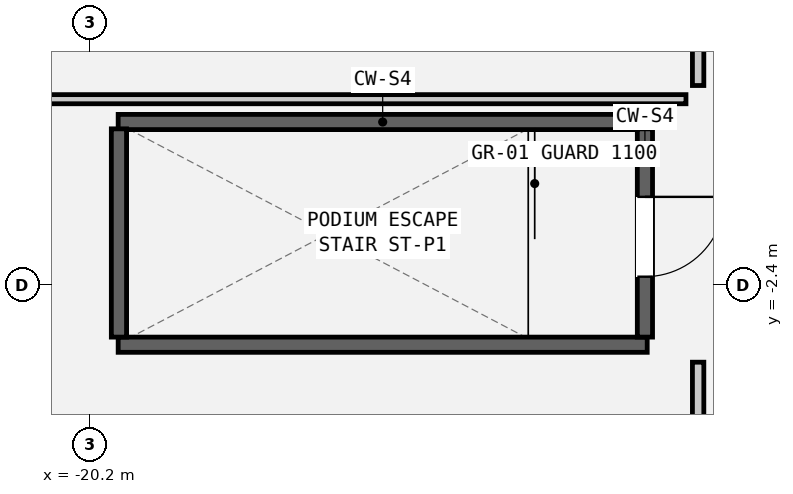
"""IFC4 building model, lengths in metres.
Left out: names, types, materials, properties, quantities, classifications, styles, units other than length and angle.
Written with IfcOpenShell. Run it as: python <this file> out.ifc"""

import sys

from ifc_helpers import new_model, si_unit, direction, frame, frame_2d, origin, place, context, subcontext, project, spatial, rectangle, extrude, element, fill, save


model = new_model("IFC4")
c1 = context("Model", 3, precision=1e-05, world=origin(), true_north=direction((0.0, 1.0)))
c2 = subcontext(c1, "Body", "Model", "MODEL_VIEW")
j1 = project(units=[si_unit("LENGTHUNIT", "METRE"), si_unit("PLANEANGLEUNIT", "RADIAN")], contexts=[c1])
p1 = place(None, origin())
s1 = spatial("IfcSite", under=j1, at=p1, CompositionType="ELEMENT")
p2 = place(p1, origin())
s2 = spatial("IfcBuilding", under=s1, at=p2, CompositionType="ELEMENT")
p3 = place(p2, frame((0.0, 0.0, 26.1)))
s3 = spatial("IfcBuildingStorey", under=s2, at=p3, CompositionType="ELEMENT", Elevation=26.1)
for number, where, z_axis, x_axis in (
    (1, (-19.83, -0.25, 0.0), (0.0, 0.0, 1.0), (1.0, 0.0, 0.0)),
    (2, (-19.83, -3.18, 0.0), (0.0, 0.0, 1.0), (1.0, 0.0, 0.0)),
):
    element("IfcWall", number, at=place(p3, frame(where, z_axis=z_axis, x_axis=x_axis)), inside=s3, PredefinedType="SHEAR", context=c2, shape_type="SweptSolid", body=[
        extrude(rectangle(XDim=6.96, YDim=0.2, at=frame_2d((3.48, 0.0))), origin(), (0.0, 0.0, 1.0), 2.83),
    ])
p4 = place(p3, frame((-12.9, -0.34, 0.0), z_axis=(0.0, 0.0, 1.0), x_axis=(0.0, -1.0, 0.0)))
e3 = element("IfcWall", 3, at=p4, inside=s3, PredefinedType="SHEAR", context=c2, shape_type="SweptSolid", body=[
    extrude(rectangle(XDim=2.74, YDim=0.2, at=frame_2d((1.37, 0.0))), origin(), (0.0, 0.0, 1.0), 2.83),
])
p5 = place(p4, frame((0.895, 0.0, 0.0)))
e4 = element("IfcOpeningElement", 4, at=p5, cuts=e3, PredefinedType="OPENING", context=c2, shape_type="SweptSolid", body=[
    extrude(rectangle(XDim=1.05, YDim=2.08, at=frame_2d((0.525, 1.04))), frame((0.0, 0.112, 0.0), z_axis=(0.0, -1.0, 0.0), x_axis=(1.0, 0.0, 0.0)), (0.0, 0.0, 1.0), 0.224),
])
p6 = place(p3, frame((-19.82, -3.08, 0.0), z_axis=(0.0, 0.0, 1.0), x_axis=(0.0, 1.0, 0.0)))
e5 = element("IfcWall", 5, at=p6, inside=s3, PredefinedType="SHEAR", context=c2, shape_type="SweptSolid", body=[
    extrude(rectangle(XDim=2.74, YDim=0.2, at=frame_2d((1.37, 0.0))), origin(), (0.0, 0.0, 1.0), 2.83),
])
p7 = place(p3, frame((-26.28, 0.05, 0.0), z_axis=(0.0, 0.0, 1.0), x_axis=(1.0, 0.0, 0.0)))
e6 = element("IfcWall", 6, at=p7, inside=s3, PredefinedType="PARTITIONING", context=c2, shape_type="SweptSolid", body=[
    extrude(rectangle(XDim=13.92, YDim=0.12, at=frame_2d((6.96, 0.0))), origin(), (0.0, 0.0, 1.0), 2.83),
])
p8 = place(p3, frame((-12.2, -11.42, 0.0), z_axis=(0.0, 0.0, 1.0), x_axis=(0.0, 1.0, 0.0)))
e7 = element("IfcWall", 7, at=p8, inside=s3, PredefinedType="PARTITIONING", context=c2, shape_type="SweptSolid", body=[
    extrude(rectangle(XDim=8.01, YDim=0.15, at=frame_2d((4.005, 0.0))), origin(), (0.0, 0.0, 1.0), 2.83),
])
p9 = place(p8, frame((3.53, 0.0, 0.0)))
e8 = element("IfcOpeningElement", 8, at=p9, cuts=e7, PredefinedType="OPENING", context=c2, shape_type="SweptSolid", body=[
    extrude(rectangle(XDim=0.95, YDim=2.1, at=frame_2d((0.475, 1.05))), frame((0.0, 0.087, 0.0), z_axis=(0.0, -1.0, 0.0), x_axis=(1.0, 0.0, 0.0)), (0.0, 0.0, 1.0), 0.174),
])
p10 = place(p3, frame((-12.2, 0.23, 0.0), z_axis=(0.0, 0.0, 1.0), x_axis=(0.0, 1.0, 0.0)))
e9 = element("IfcWall", 9, at=p10, inside=s3, PredefinedType="PARTITIONING", context=c2, shape_type="SweptSolid", body=[
    extrude(rectangle(XDim=12.39, YDim=0.15, at=frame_2d((6.195, 0.0))), origin(), (0.0, 0.0, 1.0), 2.83),
])
p11 = place(p10, frame((5.72, 0.0, 0.0)))
e10 = element("IfcOpeningElement", 10, at=p11, cuts=e9, PredefinedType="OPENING", context=c2, shape_type="SweptSolid", body=[
    extrude(rectangle(XDim=0.95, YDim=2.1, at=frame_2d((0.475, 1.05))), frame((0.0, 0.087, 0.0), z_axis=(0.0, -1.0, 0.0), x_axis=(1.0, 0.0, 0.0)), (0.0, 0.0, 1.0), 0.174),
])
p12 = place(p5, origin())
e11 = element("IfcDoor", 11, at=p12, inside=s3, OperationType="SINGLE_SWING_LEFT", PredefinedType="DOOR", context=c2, shape_type="SweptSolid", body=[
    extrude(rectangle(XDim=1.05, YDim=2.08, at=frame_2d((0.525, 1.04))), frame((0.0, 0.025, 0.0), z_axis=(0.0, -1.0, 0.0), x_axis=(1.0, 0.0, 0.0)), (0.0, 0.0, 1.0), 0.05),
])
fill(e4, e11)
save(model, sys.argv[1])
